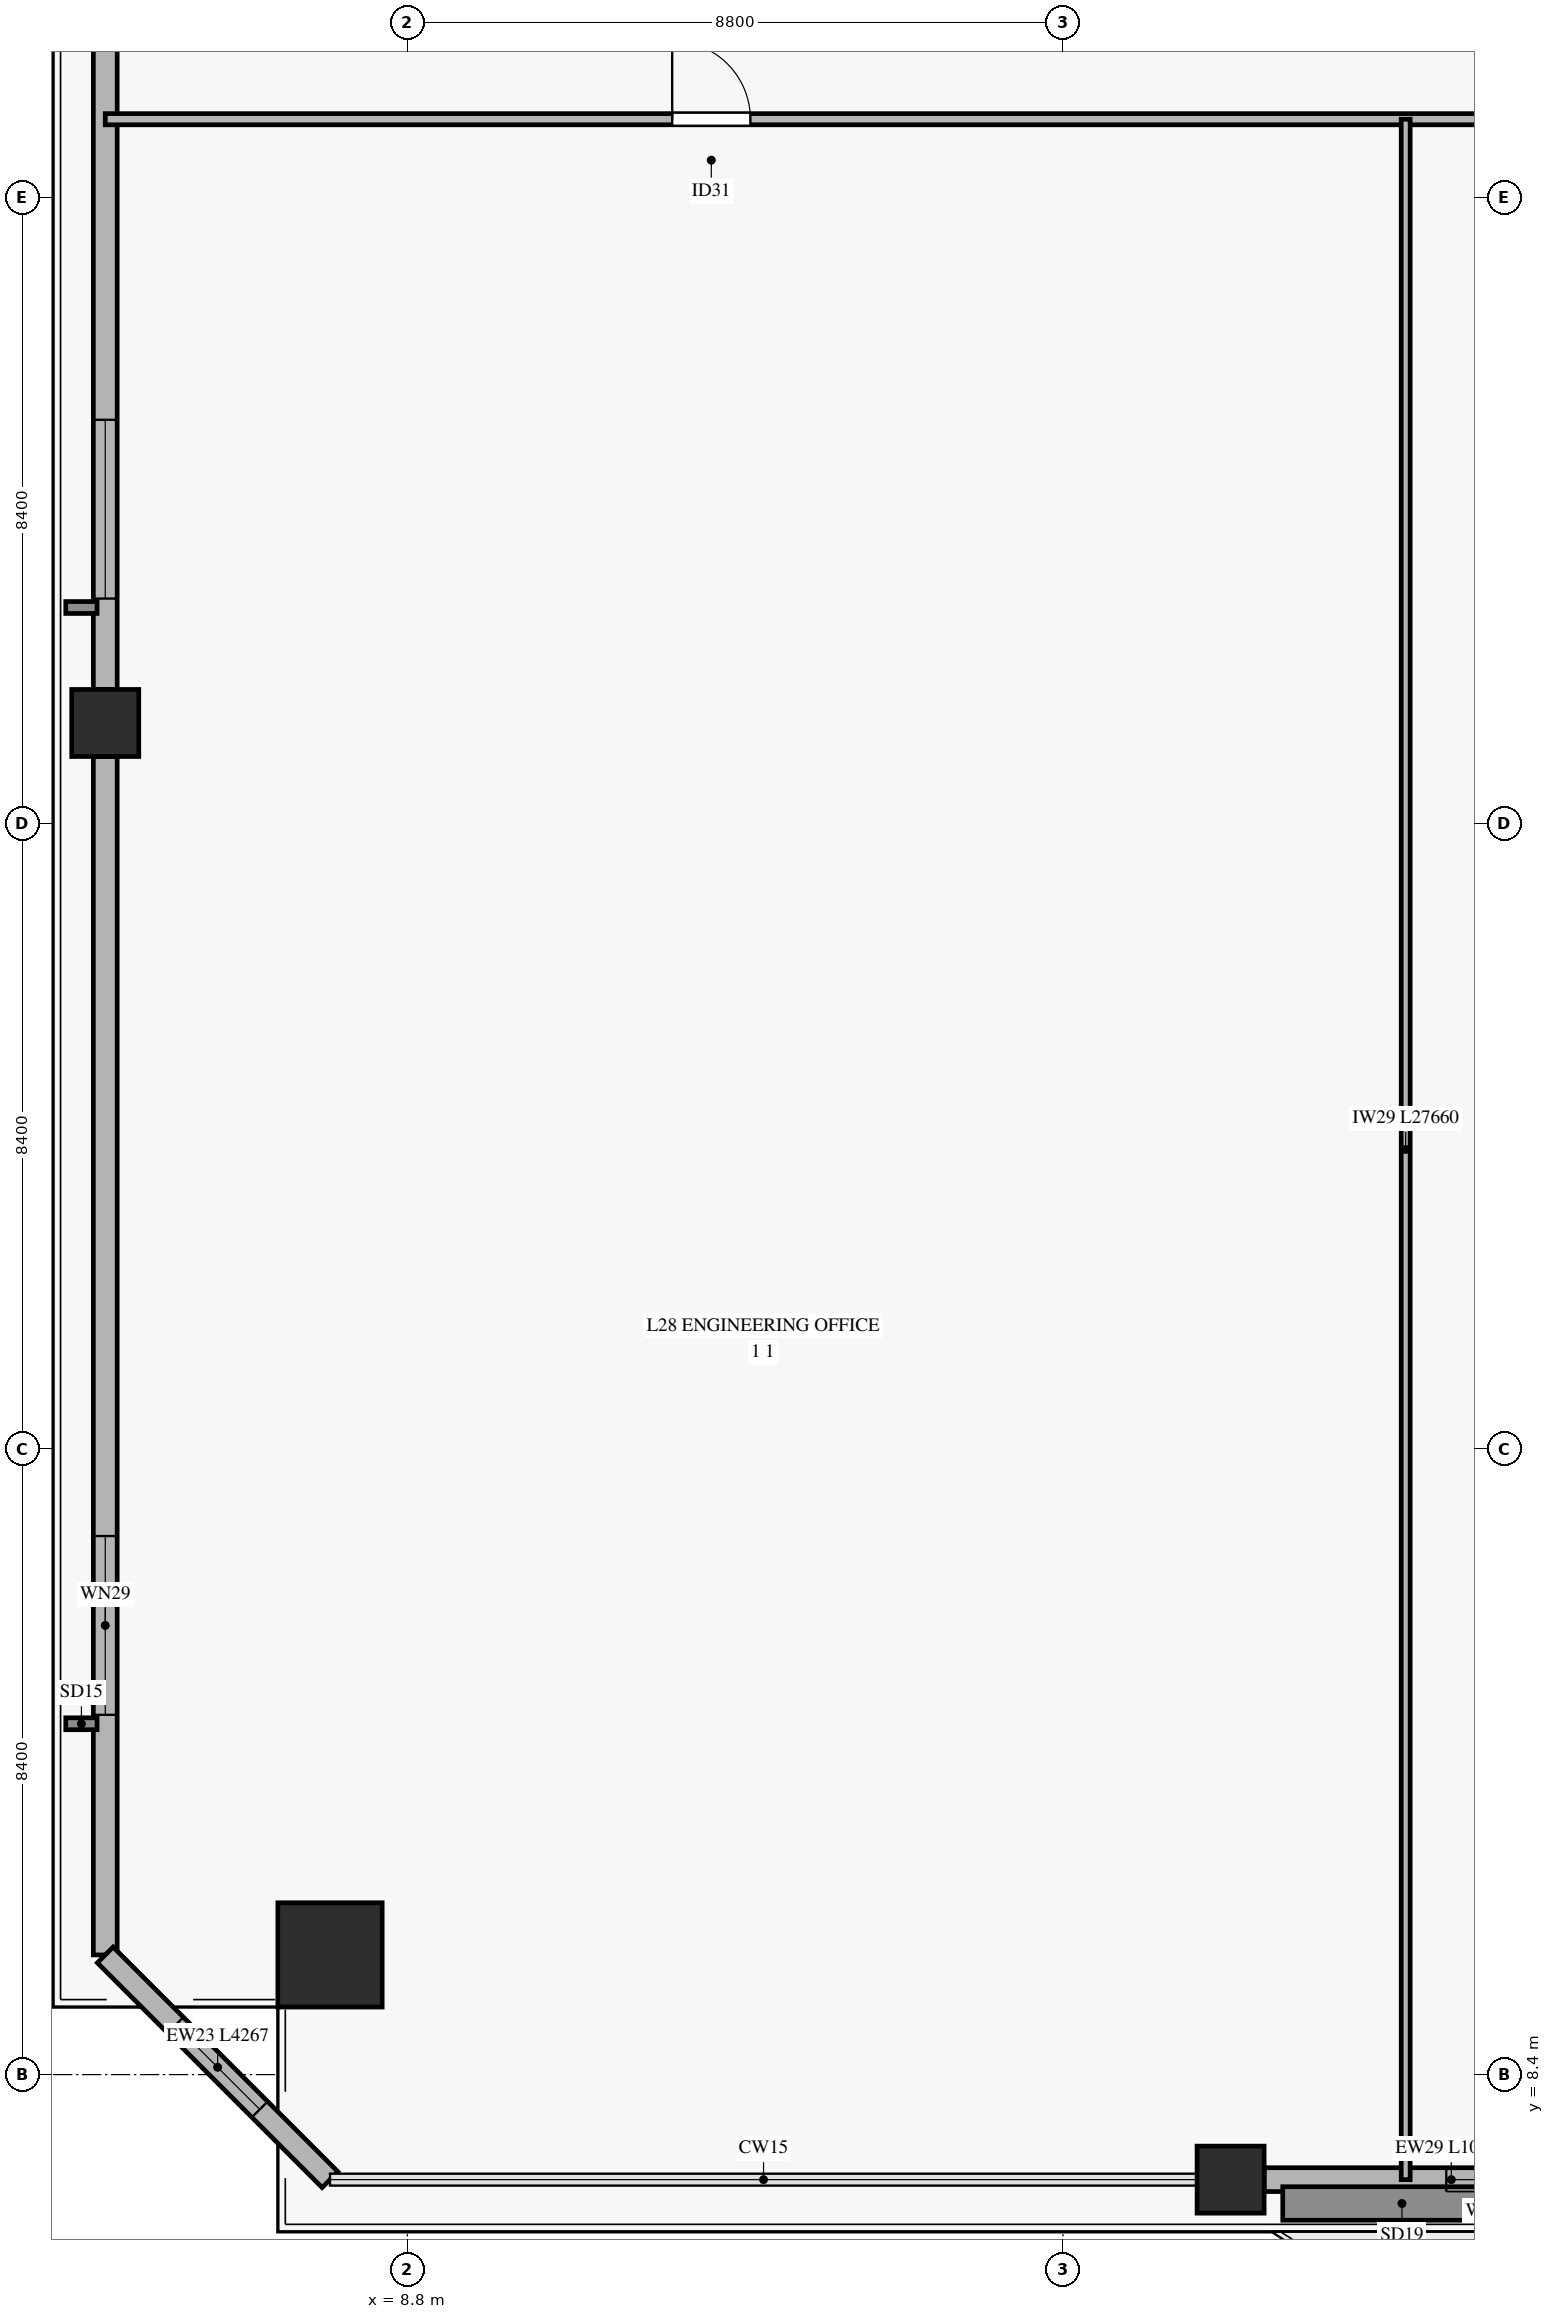
"""IFC4 building model, lengths in metres.
Left out: names, types, materials, properties, quantities, classifications, styles, units other than length and angle.
Written with IfcOpenShell. Run it as: python <this file> out.ifc"""

import sys

from ifc_helpers import new_model, si_unit, direction, frame, frame_2d, origin, origin_2d, place, context, subcontext, project, spatial, rectangle, hollow_rectangle, extrude, source, transform, mapped, element, fill, save


model = new_model("IFC4")
c1 = context("Model", 3, precision=1e-05, world=origin(), true_north=direction((0.0, 1.0)))
c2 = subcontext(c1, "Body", "Model", "MODEL_VIEW")
j1 = project(units=[si_unit("LENGTHUNIT", "METRE"), si_unit("PLANEANGLEUNIT", "RADIAN")], contexts=[c1])
p1 = place(None, origin())
s1 = spatial("IfcSite", under=j1, at=p1, CompositionType="ELEMENT")
p2 = place(p1, origin())
s2 = spatial("IfcBuilding", under=s1, at=p2, CompositionType="ELEMENT")
p3 = place(p2, frame((0.0, 0.0, 115.3)))
s3 = spatial("IfcBuildingStorey", under=s2, at=p3, CompositionType="ELEMENT", Elevation=115.3)
m1 = source(origin(), c2, "Body", "SweptSolid", [
    extrude(hollow_rectangle(XDim=1.4, YDim=1.4, WallThickness=0.065, at=origin_2d()), origin(), (0.0, 0.0, 1.0), 3.68),
])
p4 = place(p3, frame((7.761, 10.007, 0.0), z_axis=(0.0, 0.0, 1.0), x_axis=(1.0, 0.0, 0.0)))
e1 = element("IfcColumn", 1, at=p4, inside=s3, PredefinedType="COLUMN", context=c2, shape_type="MappedRepresentation", body=[
    mapped(m1, transform((0.0, 0.0, 0.0), x_axis=(1.0, 0.0, 0.0), y_axis=(0.0, 1.0, 0.0), z_axis=(0.0, 0.0, 1.0), scale=1.0)),
])
m2 = source(origin(), c2, "Body", "SweptSolid", [
    extrude(hollow_rectangle(XDim=0.9, YDim=0.9, WallThickness=0.04, at=origin_2d()), origin(), (0.0, 0.0, 1.0), 3.68),
])
for number, where, z_axis, x_axis in (
    (2, (19.85, 6.99, 0.0), (0.0, 0.0, 1.0), (1.0, 0.0, 0.0)),
    (3, (4.744, 26.545, 0.0), (0.0, 0.0, 1.0), (1.0, 0.0, 0.0)),
):
    element("IfcColumn", number, at=place(p3, frame(where, z_axis=z_axis, x_axis=x_axis)), inside=s3, PredefinedType="COLUMN", context=c2, shape_type="MappedRepresentation", body=[
        mapped(m2, transform((0.0, 0.0, 0.0), x_axis=(1.0, 0.0, 0.0), y_axis=(0.0, 1.0, 0.0), z_axis=(0.0, 0.0, 1.0), scale=1.0)),
    ])
p5 = place(p3, frame((20.3, 6.99, 0.0), z_axis=(0.0, 0.0, 1.0), x_axis=(1.0, 0.0, 0.0)))
e4 = element("IfcWall", 4, at=p5, inside=s3, PredefinedType="SOLIDWALL", context=c2, shape_type="SweptSolid", body=[
    extrude(rectangle(XDim=10.05, YDim=0.32, at=frame_2d((5.025, 0.0))), origin(), (0.0, 0.0, 1.0), 3.16),
])
p6 = place(p5, frame((4.1, 0.0, 0.0)))
e5 = element("IfcOpeningElement", 5, at=p6, cuts=e4, PredefinedType="OPENING", context=c2, shape_type="SweptSolid", body=[
    extrude(rectangle(XDim=1.8, YDim=2.25, at=frame_2d((0.9, 1.125))), frame((0.0, 0.17, 0.0), z_axis=(0.0, -1.0, 0.0), x_axis=(1.0, 0.0, 0.0)), (0.0, 0.0, 1.0), 0.34),
])
p7 = place(p5, frame((2.445, 0.0, 0.45)))
e6 = element("IfcOpeningElement", 6, at=p7, cuts=e4, PredefinedType="OPENING", context=c2, shape_type="SweptSolid", body=[
    extrude(rectangle(XDim=1.2, YDim=2.0, at=frame_2d((0.6, 1.0))), frame((0.0, 0.17, 0.0), z_axis=(0.0, -1.0, 0.0), x_axis=(1.0, 0.0, 0.0)), (0.0, 0.0, 1.0), 0.34),
])
p8 = place(p5, frame((6.5, 0.0, 0.45)))
e7 = element("IfcOpeningElement", 7, at=p8, cuts=e4, PredefinedType="OPENING", context=c2, shape_type="SweptSolid", body=[
    extrude(rectangle(XDim=1.6, YDim=2.0, at=frame_2d((0.8, 1.0))), frame((0.0, 0.17, 0.0), z_axis=(0.0, -1.0, 0.0), x_axis=(1.0, 0.0, 0.0)), (0.0, 0.0, 1.0), 0.34),
])
p9 = place(p3, frame((4.744, 10.007, 0.0), z_axis=(0.0, 0.0, 1.0), x_axis=(0.0, 1.0, 0.0)))
e8 = element("IfcWall", 8, at=p9, inside=s3, PredefinedType="SOLIDWALL", context=c2, shape_type="SweptSolid", body=[
    extrude(rectangle(XDim=16.088, YDim=0.32, at=frame_2d((8.044, 0.0))), origin(), (0.0, 0.0, 1.0), 3.16),
])
p10 = place(p9, frame((3.223, 0.0, 0.45)))
e9 = element("IfcOpeningElement", 9, at=p10, cuts=e8, PredefinedType="OPENING", context=c2, shape_type="SweptSolid", body=[
    extrude(rectangle(XDim=2.4, YDim=2.1, at=frame_2d((1.2, 1.05))), frame((0.0, 0.17, 0.0), z_axis=(0.0, -1.0, 0.0), x_axis=(1.0, 0.0, 0.0)), (0.0, 0.0, 1.0), 0.34),
])
p11 = place(p3, frame((4.744, 26.995, 0.0), z_axis=(0.0, 0.0, 1.0), x_axis=(0.0, 1.0, 0.0)))
e10 = element("IfcWall", 10, at=p11, inside=s3, PredefinedType="SOLIDWALL", context=c2, shape_type="SweptSolid", body=[
    extrude(rectangle(XDim=16.088, YDim=0.32, at=frame_2d((8.044, 0.0))), origin(), (0.0, 0.0, 1.0), 3.16),
])
p12 = place(p11, frame((1.22, 0.0, 0.45)))
e11 = element("IfcOpeningElement", 11, at=p12, cuts=e10, PredefinedType="OPENING", context=c2, shape_type="SweptSolid", body=[
    extrude(rectangle(XDim=2.4, YDim=2.1, at=frame_2d((1.2, 1.05))), frame((0.0, 0.17, 0.0), z_axis=(0.0, -1.0, 0.0), x_axis=(1.0, 0.0, 0.0)), (0.0, 0.0, 1.0), 0.34),
])
p13 = place(p11, frame((12.375, 0.0, 0.45)))
e12 = element("IfcOpeningElement", 12, at=p13, cuts=e10, PredefinedType="OPENING", context=c2, shape_type="SweptSolid", body=[
    extrude(rectangle(XDim=2.4, YDim=2.1, at=frame_2d((1.2, 1.05))), frame((0.0, 0.17, 0.0), z_axis=(0.0, -1.0, 0.0), x_axis=(1.0, 0.0, 0.0)), (0.0, 0.0, 1.0), 0.34),
])
p14 = place(p3, frame((4.744, 10.007, 0.0), z_axis=(0.0, 0.0, 1.0), x_axis=(0.707106781187, -0.707106781187, 0.0)))
e13 = element("IfcWall", 13, at=p14, inside=s3, PredefinedType="SOLIDWALL", context=c2, shape_type="SweptSolid", body=[
    extrude(rectangle(XDim=4.267, YDim=0.3, at=frame_2d((2.133, 0.0))), origin(), (0.0, 0.0, 1.0), 3.16),
])
p15 = place(p14, frame((1.333, 0.0, 0.45)))
e14 = element("IfcOpeningElement", 14, at=p15, cuts=e13, PredefinedType="OPENING", context=c2, shape_type="SweptSolid", body=[
    extrude(rectangle(XDim=1.6, YDim=2.0, at=frame_2d((0.8, 1.0))), frame((0.0, 0.16, 0.0), z_axis=(0.0, -1.0, 0.0), x_axis=(1.0, 0.0, 0.0)), (0.0, 0.0, 1.0), 0.32),
])
p16 = place(p3, frame((4.744, 34.65, 0.0), z_axis=(0.0, 0.0, 1.0), x_axis=(1.0, 0.0, 0.0)))
e15 = element("IfcWall", 15, at=p16, inside=s3, PredefinedType="PARTITIONING", context=c2, shape_type="SweptSolid", body=[
    extrude(rectangle(XDim=60.912, YDim=0.15, at=frame_2d((30.456, 0.0))), origin(), (0.0, 0.0, 1.0), 2.765),
])
p17 = place(p16, frame((7.61, 0.0, 0.0)))
e16 = element("IfcOpeningElement", 16, at=p17, cuts=e15, PredefinedType="OPENING", context=c2, shape_type="SweptSolid", body=[
    extrude(rectangle(XDim=1.05, YDim=2.15, at=frame_2d((0.525, 1.075))), frame((0.0, 0.085, 0.0), z_axis=(0.0, -1.0, 0.0), x_axis=(1.0, 0.0, 0.0)), (0.0, 0.0, 1.0), 0.17),
])
p18 = place(p16, frame((20.391, 0.0, 0.0)))
e17 = element("IfcOpeningElement", 17, at=p18, cuts=e15, PredefinedType="OPENING", context=c2, shape_type="SweptSolid", body=[
    extrude(rectangle(XDim=1.05, YDim=2.15, at=frame_2d((0.525, 1.075))), frame((0.0, 0.085, 0.0), z_axis=(0.0, -1.0, 0.0), x_axis=(1.0, 0.0, 0.0)), (0.0, 0.0, 1.0), 0.17),
])
p19 = place(p16, frame((26.622, 0.0, 0.0)))
e18 = element("IfcOpeningElement", 18, at=p19, cuts=e15, PredefinedType="OPENING", context=c2, shape_type="SweptSolid", body=[
    extrude(rectangle(XDim=1.05, YDim=2.15, at=frame_2d((0.525, 1.075))), frame((0.0, 0.085, 0.0), z_axis=(0.0, -1.0, 0.0), x_axis=(1.0, 0.0, 0.0)), (0.0, 0.0, 1.0), 0.17),
])
p20 = place(p16, frame((32.462, 0.0, 0.0)))
e19 = element("IfcOpeningElement", 19, at=p20, cuts=e15, PredefinedType="OPENING", context=c2, shape_type="SweptSolid", body=[
    extrude(rectangle(XDim=1.05, YDim=2.15, at=frame_2d((0.525, 1.075))), frame((0.0, 0.085, 0.0), z_axis=(0.0, -1.0, 0.0), x_axis=(1.0, 0.0, 0.0)), (0.0, 0.0, 1.0), 0.17),
])
p21 = place(p16, frame((37.919, 0.0, 0.0)))
e20 = element("IfcOpeningElement", 20, at=p21, cuts=e15, PredefinedType="OPENING", context=c2, shape_type="SweptSolid", body=[
    extrude(rectangle(XDim=1.05, YDim=2.15, at=frame_2d((0.525, 1.075))), frame((0.0, 0.085, 0.0), z_axis=(0.0, -1.0, 0.0), x_axis=(1.0, 0.0, 0.0)), (0.0, 0.0, 1.0), 0.17),
])
p22 = place(p16, frame((48.844, 0.0, 0.0)))
e21 = element("IfcOpeningElement", 21, at=p22, cuts=e15, PredefinedType="OPENING", context=c2, shape_type="SweptSolid", body=[
    extrude(rectangle(XDim=1.05, YDim=2.15, at=frame_2d((0.525, 1.075))), frame((0.0, 0.085, 0.0), z_axis=(0.0, -1.0, 0.0), x_axis=(1.0, 0.0, 0.0)), (0.0, 0.0, 1.0), 0.17),
])
p23 = place(p3, frame((22.2, 6.99, 0.0), z_axis=(0.0, 0.0, 1.0), x_axis=(0.0, 1.0, 0.0)))
e22 = element("IfcWall", 22, at=p23, inside=s3, PredefinedType="PARTITIONING", context=c2, shape_type="SweptSolid", body=[
    extrude(rectangle(XDim=27.66, YDim=0.12, at=frame_2d((13.83, 0.0))), origin(), (0.0, 0.0, 1.0), 3.165),
])
m3 = source(origin(), c2, "Body", "SweptSolid", [
    extrude(rectangle(XDim=1.2, YDim=2.0, at=frame_2d((0.6, 1.0))), frame((0.0, 0.03, 0.0), z_axis=(0.0, -1.0, 0.0), x_axis=(1.0, 0.0, 0.0)), (0.0, 0.0, 1.0), 0.06),
])
p24 = place(p7, origin())
e23 = element("IfcWindow", 23, at=p24, inside=s3, PartitioningType="SINGLE_PANEL", PredefinedType="WINDOW", context=c2, shape_type="MappedRepresentation", body=[
    mapped(m3, transform((0.0, 0.0, 0.0), x_axis=(1.0, 0.0, 0.0), y_axis=(0.0, 1.0, 0.0), z_axis=(0.0, 0.0, 1.0), scale=1.0)),
])
fill(e6, e23)
m4 = source(origin(), c2, "Body", "SweptSolid", [
    extrude(rectangle(XDim=2.4, YDim=2.1, at=frame_2d((1.2, 1.05))), frame((0.0, 0.03, 0.0), z_axis=(0.0, -1.0, 0.0), x_axis=(1.0, 0.0, 0.0)), (0.0, 0.0, 1.0), 0.06),
])
p25 = place(p10, origin())
e24 = element("IfcWindow", 24, at=p25, inside=s3, PartitioningType="SINGLE_PANEL", PredefinedType="WINDOW", context=c2, shape_type="MappedRepresentation", body=[
    mapped(m4, transform((0.0, 0.0, 0.0), x_axis=(1.0, 0.0, 0.0), y_axis=(0.0, 1.0, 0.0), z_axis=(0.0, 0.0, 1.0), scale=1.0)),
])
fill(e9, e24)
p26 = place(p12, origin())
e25 = element("IfcWindow", 25, at=p26, inside=s3, PartitioningType="SINGLE_PANEL", PredefinedType="WINDOW", context=c2, shape_type="MappedRepresentation", body=[
    mapped(m4, transform((0.0, 0.0, 0.0), x_axis=(1.0, 0.0, 0.0), y_axis=(0.0, 1.0, 0.0), z_axis=(0.0, 0.0, 1.0), scale=1.0)),
])
fill(e11, e25)
m5 = source(origin(), c2, "Body", "SweptSolid", [
    extrude(rectangle(XDim=1.6, YDim=2.0, at=frame_2d((0.8, 1.0))), frame((0.0, 0.03, 0.0), z_axis=(0.0, -1.0, 0.0), x_axis=(1.0, 0.0, 0.0)), (0.0, 0.0, 1.0), 0.06),
])
p27 = place(p15, origin())
e26 = element("IfcWindow", 26, at=p27, inside=s3, PartitioningType="SINGLE_PANEL", PredefinedType="WINDOW", context=c2, shape_type="MappedRepresentation", body=[
    mapped(m5, transform((0.0, 0.0, 0.0), x_axis=(1.0, 0.0, 0.0), y_axis=(0.0, 1.0, 0.0), z_axis=(0.0, 0.0, 1.0), scale=1.0)),
])
fill(e14, e26)
m6 = source(origin(), c2, "Body", "SweptSolid", [
    extrude(rectangle(XDim=1.05, YDim=2.15, at=frame_2d((0.525, 1.075))), frame((0.0, 0.025, 0.0), z_axis=(0.0, -1.0, 0.0), x_axis=(1.0, 0.0, 0.0)), (0.0, 0.0, 1.0), 0.05),
])
p28 = place(p17, origin())
e27 = element("IfcDoor", 27, at=p28, inside=s3, OperationType="SINGLE_SWING_LEFT", PredefinedType="DOOR", context=c2, shape_type="MappedRepresentation", body=[
    mapped(m6, transform((0.0, 0.0, 0.0), x_axis=(1.0, 0.0, 0.0), y_axis=(0.0, 1.0, 0.0), z_axis=(0.0, 0.0, 1.0), scale=1.0)),
])
fill(e16, e27)
save(model, sys.argv[1])
